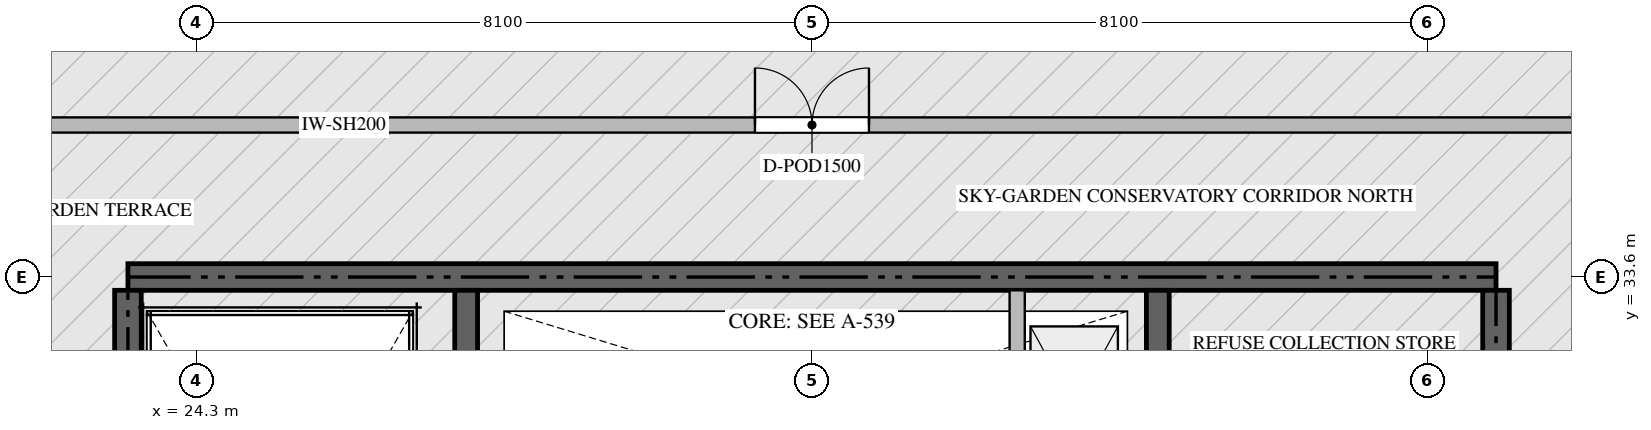
"""IFC4 building model, lengths in metres.
Left out: names, types, materials, properties, quantities, classifications, styles, units other than length and angle.
Written with IfcOpenShell. Run it as: python <this file> out.ifc"""

import sys

from ifc_helpers import new_model, si_unit, direction, frame, frame_2d, origin, place, context, subcontext, project, spatial, rectangle, extrude, source, transform, mapped, element, fill, save


model = new_model("IFC4")
c1 = context("Model", 3, precision=1e-05, world=origin(), true_north=direction((0.0, 1.0)))
c2 = subcontext(c1, "Body", "Model", "MODEL_VIEW")
j1 = project(units=[si_unit("LENGTHUNIT", "METRE"), si_unit("PLANEANGLEUNIT", "RADIAN")], contexts=[c1])
p1 = place(None, origin())
s1 = spatial("IfcSite", under=j1, at=p1, CompositionType="ELEMENT")
p2 = place(p1, origin())
s2 = spatial("IfcBuilding", under=s1, at=p2, CompositionType="ELEMENT")
p3 = place(p2, frame((0.0, 0.0, 359.75)))
s3 = spatial("IfcBuildingStorey", under=s2, at=p3, CompositionType="ELEMENT", Elevation=359.75)
p4 = place(p3, frame((41.4, 33.6, -0.36), z_axis=(0.0, 0.0, 1.0), x_axis=(-1.0, 0.0, 0.0)))
e1 = element("IfcWall", 1, at=p4, inside=s3, PredefinedType="SHEAR", context=c2, shape_type="SweptSolid", body=[
    extrude(rectangle(XDim=18.0, YDim=0.35, at=frame_2d((9.0, 0.0))), origin(), (0.0, 0.0, 1.0), 5.998),
])
p5 = place(p3, frame((23.4, 24.25, -0.36), z_axis=(0.0, 0.0, 1.0), x_axis=(0.0, 1.0, 0.0)))
e2 = element("IfcWall", 2, at=p5, inside=s3, PredefinedType="SHEAR", context=c2, shape_type="SweptSolid", body=[
    extrude(rectangle(XDim=9.175, YDim=0.35, at=frame_2d((4.587, 0.0))), origin(), (0.0, 0.0, 1.0), 5.998),
])
p6 = place(p3, frame((41.4, 27.75, -0.36), z_axis=(0.0, 0.0, 1.0), x_axis=(0.0, 1.0, 0.0)))
e3 = element("IfcWall", 3, at=p6, inside=s3, PredefinedType="SHEAR", context=c2, shape_type="SweptSolid", body=[
    extrude(rectangle(XDim=5.675, YDim=0.35, at=frame_2d((2.837, 0.0))), origin(), (0.0, 0.0, 1.0), 5.998),
])
p7 = place(p3, frame((27.85, 23.55, -0.36), z_axis=(0.0, 0.0, 1.0), x_axis=(0.0, 1.0, 0.0)))
e4 = element("IfcWall", 4, at=p7, inside=s3, PredefinedType="SHEAR", context=c2, shape_type="SweptSolid", body=[
    extrude(rectangle(XDim=9.875, YDim=0.3, at=frame_2d((4.938, 0.0))), origin(), (0.0, 0.0, 1.0), 5.998),
])
p8 = place(p3, frame((36.95, 27.05, -0.36), z_axis=(0.0, 0.0, 1.0), x_axis=(0.0, 1.0, 0.0)))
e5 = element("IfcWall", 5, at=p8, inside=s3, PredefinedType="SHEAR", context=c2, shape_type="SweptSolid", body=[
    extrude(rectangle(XDim=6.375, YDim=0.3, at=frame_2d((3.188, 0.0))), origin(), (0.0, 0.0, 1.0), 5.998),
])
p9 = place(p3, frame((35.1, 30.75, 0.0), z_axis=(0.0, 0.0, 1.0), x_axis=(0.0, 1.0, 0.0)))
e6 = element("IfcWall", 6, at=p9, inside=s3, PredefinedType="STANDARD", context=c2, shape_type="SweptSolid", body=[
    extrude(rectangle(XDim=2.675, YDim=0.2, at=frame_2d((1.337, 0.0))), origin(), (0.0, 0.0, 1.0), 5.64),
])
p10 = place(p3, frame((21.4, 35.6, 0.0), z_axis=(0.0, 0.0, 1.0), x_axis=(1.0, 0.0, 0.0)))
e7 = element("IfcWall", 7, at=p10, inside=s3, PredefinedType="STANDARD", context=c2, shape_type="SweptSolid", body=[
    extrude(rectangle(XDim=22.0, YDim=0.2, at=frame_2d((11.0, 0.0))), origin(), (0.0, 0.0, 1.0), 5.64),
])
p11 = place(p10, frame((10.25, 0.0, 0.0)))
e8 = element("IfcOpeningElement", 8, at=p11, cuts=e7, PredefinedType="OPENING", context=c2, shape_type="SweptSolid", body=[
    extrude(rectangle(XDim=1.5, YDim=2.25, at=frame_2d((0.75, 1.125))), frame((0.0, 0.11, 0.0), z_axis=(0.0, -1.0, 0.0), x_axis=(1.0, 0.0, 0.0)), (0.0, 0.0, 1.0), 0.22),
])
m1 = source(origin(), c2, "Body", "SweptSolid", [
    extrude(rectangle(XDim=1.5, YDim=2.25, at=frame_2d((0.75, 1.125))), frame((0.0, 0.025, 0.0), z_axis=(0.0, -1.0, 0.0), x_axis=(1.0, 0.0, 0.0)), (0.0, 0.0, 1.0), 0.05),
])
p12 = place(p11, origin())
e9 = element("IfcDoor", 9, at=p12, inside=s3, OperationType="DOUBLE_DOOR_SINGLE_SWING", PredefinedType="DOOR", context=c2, shape_type="MappedRepresentation", body=[
    mapped(m1, transform((0.0, 0.0, 0.0), scale=1.0)),
])
fill(e8, e9)
save(model, sys.argv[1])
